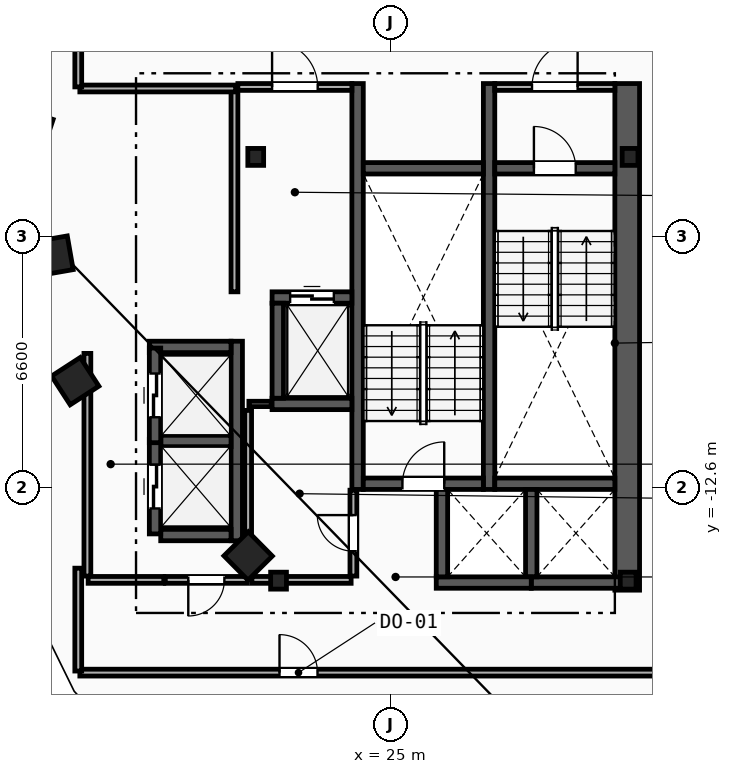
"""IFC4 building model, lengths in metres.
Left out: names, types, materials, properties, quantities, classifications, styles, units other than length and angle.
Written with IfcOpenShell. Run it as: python <this file> out.ifc"""

import sys

from ifc_helpers import new_model, si_unit, direction, frame, frame_2d, origin, origin_2d, place, context, subcontext, project, spatial, rectangle, i_section, extrude, element, fill, save


model = new_model("IFC4")
c1 = context("Model", 3, precision=1e-05, world=origin(), true_north=direction((0.0, 1.0)))
c2 = subcontext(c1, "Body", "Model", "MODEL_VIEW")
j1 = project(units=[si_unit("LENGTHUNIT", "METRE"), si_unit("PLANEANGLEUNIT", "RADIAN")], contexts=[c1])
p1 = place(None, origin())
s1 = spatial("IfcSite", under=j1, at=p1, CompositionType="ELEMENT")
p2 = place(p1, origin())
s2 = spatial("IfcBuilding", under=s1, at=p2, CompositionType="ELEMENT")
p3 = place(p2, frame((0.0, 0.0, 195.4)))
s3 = spatial("IfcBuildingStorey", under=s2, at=p3, CompositionType="ELEMENT", Elevation=195.4)
for number, where, z_axis, x_axis in (
    (1, (31.3, -3.9, 0.0), (0.0, 0.0, 1.0), (1.0, 0.0, 0.0)),
    (2, (21.45, -3.9, 0.0), (0.0, 0.0, 1.0), (1.0, 0.0, 0.0)),
    (3, (22.05, -15.05, 0.0), (0.0, 0.0, 1.0), (1.0, 0.0, 0.0)),
    (4, (31.25, -15.05, 0.0), (0.0, 0.0, 1.0), (1.0, 0.0, 0.0)),
):
    element("IfcColumn", number, at=place(p3, frame(where, z_axis=z_axis, x_axis=x_axis)), inside=s3, PredefinedType="COLUMN", context=c2, shape_type="SweptSolid", body=[
        extrude(i_section(OverallWidth=0.416, OverallDepth=0.446, WebThickness=0.039, FlangeThickness=0.063, FilletRadius=0.018, at=origin_2d()), origin(), (0.0, 0.0, 1.0), 3.6),
    ])
for number, where, z_axis, x_axis in (
    (5, (15.55, -3.2, 0.0), (0.0, 0.0, 1.0), (-0.315, -0.949, 0.0)),
    (6, (16.125, -6.5, 0.0), (0.0, 0.0, 1.0), (0.172, -0.985, 0.0)),
    (7, (16.7, -9.8, 0.0), (0.0, 0.0, 1.0), (0.544, -0.839, 0.0)),
    (8, (21.25, -14.4, 0.0), (0.0, 0.0, 1.0), (0.703, -0.711, 0.0)),
):
    element("IfcColumn", number, at=place(p3, frame(where, z_axis=z_axis, x_axis=x_axis)), inside=s3, PredefinedType="COLUMN", context=c2, shape_type="SweptSolid", body=[
        extrude(rectangle(XDim=0.9, YDim=0.9, at=origin_2d()), origin(), (0.0, 0.0, 1.0), 3.6),
    ])
p4 = place(p3, frame((31.225, -15.3, 0.0), z_axis=(0.0, 0.0, 1.0), x_axis=(0.0, 1.0, 0.0)))
e9 = element("IfcWall", 9, at=p4, inside=s3, PredefinedType="SHEAR", context=c2, shape_type="SweptSolid", body=[
    extrude(rectangle(XDim=13.33, YDim=0.65, at=frame_2d((6.665, 0.0))), origin(), (0.0, 0.0, 1.0), 3.34),
])
for number, where, z_axis, x_axis in (
    (10, (27.59, -12.65, 0.0), (0.0, 0.0, 1.0), (0.0, 1.0, 0.0)),
    (11, (24.13, -12.65, 0.0), (0.0, 0.0, 1.0), (0.0, 1.0, 0.0)),
):
    element("IfcWall", number, at=place(p3, frame(where, z_axis=z_axis, x_axis=x_axis)), inside=s3, PredefinedType="SHEAR", context=c2, shape_type="SweptSolid", body=[
        extrude(rectangle(XDim=10.68, YDim=0.3, at=frame_2d((5.34, 0.0))), origin(), (0.0, 0.0, 1.0), 3.34),
    ])
p5 = place(p3, frame((27.74, -4.2, 0.0), z_axis=(0.0, 0.0, 1.0), x_axis=(1.0, 0.0, 0.0)))
e12 = element("IfcWall", 12, at=p5, inside=s3, PredefinedType="SHEAR", context=c2, shape_type="SweptSolid", body=[
    extrude(rectangle(XDim=3.16, YDim=0.3, at=frame_2d((1.58, 0.0))), origin(), (0.0, 0.0, 1.0), 3.34),
])
p6 = place(p5, frame((1.03, 0.0, 0.0)))
e13 = element("IfcOpeningElement", 13, at=p6, cuts=e12, PredefinedType="OPENING", context=c2, shape_type="SweptSolid", body=[
    extrude(rectangle(XDim=1.1, YDim=2.15, at=frame_2d((0.55, 1.075))), frame((0.0, 0.16, 0.0), z_axis=(0.0, -1.0, 0.0), x_axis=(1.0, 0.0, 0.0)), (0.0, 0.0, 1.0), 0.32),
])
p7 = place(p3, frame((27.74, -12.5, 0.0), z_axis=(0.0, 0.0, 1.0), x_axis=(1.0, 0.0, 0.0)))
e14 = element("IfcWall", 14, at=p7, inside=s3, PredefinedType="SHEAR", context=c2, shape_type="SweptSolid", body=[
    extrude(rectangle(XDim=3.16, YDim=0.3, at=frame_2d((1.58, 0.0))), origin(), (0.0, 0.0, 1.0), 3.34),
])
p8 = place(p3, frame((24.28, -12.5, 0.0), z_axis=(0.0, 0.0, 1.0), x_axis=(1.0, 0.0, 0.0)))
e15 = element("IfcWall", 15, at=p8, inside=s3, PredefinedType="SHEAR", context=c2, shape_type="SweptSolid", body=[
    extrude(rectangle(XDim=3.16, YDim=0.3, at=frame_2d((1.58, 0.0))), origin(), (0.0, 0.0, 1.0), 3.34),
])
p9 = place(p8, frame((1.03, 0.0, 0.0)))
e16 = element("IfcOpeningElement", 16, at=p9, cuts=e15, PredefinedType="OPENING", context=c2, shape_type="SweptSolid", body=[
    extrude(rectangle(XDim=1.1, YDim=2.15, at=frame_2d((0.55, 1.075))), frame((0.0, 0.16, 0.0), z_axis=(0.0, -1.0, 0.0), x_axis=(1.0, 0.0, 0.0)), (0.0, 0.0, 1.0), 0.32),
])
p10 = place(p3, frame((24.28, -4.2, 0.0), z_axis=(0.0, 0.0, 1.0), x_axis=(1.0, 0.0, 0.0)))
e17 = element("IfcWall", 17, at=p10, inside=s3, PredefinedType="SHEAR", context=c2, shape_type="SweptSolid", body=[
    extrude(rectangle(XDim=3.16, YDim=0.3, at=frame_2d((1.58, 0.0))), origin(), (0.0, 0.0, 1.0), 3.34),
])
p11 = place(p3, frame((20.89, -7.45, 0.0), z_axis=(0.0, 0.0, 1.0), x_axis=(0.0, 1.0, 0.0)))
e18 = element("IfcWall", 18, at=p11, inside=s3, PredefinedType="PARTITIONING", context=c2, shape_type="SweptSolid", body=[
    extrude(rectangle(XDim=5.3, YDim=0.18, at=frame_2d((2.65, 0.0))), origin(), (0.0, 0.0, 1.0), 3.34),
])
p12 = place(p3, frame((20.98, -2.06, 0.0), z_axis=(0.0, 0.0, 1.0), x_axis=(1.0, 0.0, 0.0)))
e19 = element("IfcWall", 19, at=p12, inside=s3, PredefinedType="PARTITIONING", context=c2, shape_type="SweptSolid", body=[
    extrude(rectangle(XDim=3.0, YDim=0.18, at=frame_2d((1.5, 0.0))), origin(), (0.0, 0.0, 1.0), 3.34),
])
p13 = place(p12, frame((0.9, 0.0, 0.0)))
e20 = element("IfcOpeningElement", 20, at=p13, cuts=e19, PredefinedType="OPENING", context=c2, shape_type="SweptSolid", body=[
    extrude(rectangle(XDim=1.2, YDim=2.15, at=frame_2d((0.6, 1.075))), frame((0.0, 0.1, 0.0), z_axis=(0.0, -1.0, 0.0), x_axis=(1.0, 0.0, 0.0)), (0.0, 0.0, 1.0), 0.2),
])
p14 = place(p3, frame((27.74, -2.06, 0.0), z_axis=(0.0, 0.0, 1.0), x_axis=(1.0, 0.0, 0.0)))
e21 = element("IfcWall", 21, at=p14, inside=s3, PredefinedType="PARTITIONING", context=c2, shape_type="SweptSolid", body=[
    extrude(rectangle(XDim=3.16, YDim=0.18, at=frame_2d((1.58, 0.0))), origin(), (0.0, 0.0, 1.0), 3.34),
])
p15 = place(p14, frame((0.98, 0.0, 0.0)))
e22 = element("IfcOpeningElement", 22, at=p15, cuts=e21, PredefinedType="OPENING", context=c2, shape_type="SweptSolid", body=[
    extrude(rectangle(XDim=1.2, YDim=2.15, at=frame_2d((0.6, 1.075))), frame((0.0, 0.1, 0.0), z_axis=(0.0, -1.0, 0.0), x_axis=(1.0, 0.0, 0.0)), (0.0, 0.0, 1.0), 0.2),
])
p16 = place(p3, frame((21.88, -7.6, 0.0), z_axis=(0.0, 0.0, 1.0), x_axis=(1.0, 0.0, 0.0)))
e23 = element("IfcWall", 23, at=p16, inside=s3, PredefinedType="SHEAR", context=c2, shape_type="SweptSolid", body=[
    extrude(rectangle(XDim=2.1, YDim=0.3, at=frame_2d((1.05, 0.0))), origin(), (0.0, 0.0, 1.0), 3.34),
])
p17 = place(p16, frame((0.475, 0.0, 0.0)))
e24 = element("IfcOpeningElement", 24, at=p17, cuts=e23, PredefinedType="OPENING", context=c2, shape_type="SweptSolid", body=[
    extrude(rectangle(XDim=1.15, YDim=2.2, at=frame_2d((0.575, 1.1))), frame((0.0, 0.16, 0.0), z_axis=(0.0, -1.0, 0.0), x_axis=(1.0, 0.0, 0.0)), (0.0, 0.0, 1.0), 0.32),
])
p18 = place(p3, frame((21.88, -10.4, 0.0), z_axis=(0.0, 0.0, 1.0), x_axis=(1.0, 0.0, 0.0)))
e25 = element("IfcWall", 25, at=p18, inside=s3, PredefinedType="SHEAR", context=c2, shape_type="SweptSolid", body=[
    extrude(rectangle(XDim=2.1, YDim=0.3, at=frame_2d((1.05, 0.0))), origin(), (0.0, 0.0, 1.0), 3.34),
])
for number, where, z_axis, x_axis in (
    (26, (22.03, -10.25, 0.0), (0.0, 0.0, 1.0), (0.0, 1.0, 0.0)),
    (27, (28.7, -15.1, 0.0), (0.0, 0.0, 1.0), (1.0, 0.0, 0.0)),
):
    element("IfcWall", number, at=place(p3, frame(where, z_axis=z_axis, x_axis=x_axis)), inside=s3, PredefinedType="SHEAR", context=c2, shape_type="SweptSolid", body=[
        extrude(rectangle(XDim=2.5, YDim=0.3, at=frame_2d((1.25, 0.0))), origin(), (0.0, 0.0, 1.0), 3.34),
    ])
p19 = place(p3, frame((28.7, -14.95, 0.0), z_axis=(0.0, 0.0, 1.0), x_axis=(0.0, 1.0, 0.0)))
e28 = element("IfcWall", 28, at=p19, inside=s3, PredefinedType="SHEAR", context=c2, shape_type="SweptSolid", body=[
    extrude(rectangle(XDim=2.3, YDim=0.3, at=frame_2d((1.15, 0.0))), origin(), (0.0, 0.0, 1.0), 3.34),
])
p20 = place(p3, frame((26.2, -15.1, 0.0), z_axis=(0.0, 0.0, 1.0), x_axis=(1.0, 0.0, 0.0)))
e29 = element("IfcWall", 29, at=p20, inside=s3, PredefinedType="SHEAR", context=c2, shape_type="SweptSolid", body=[
    extrude(rectangle(XDim=2.5, YDim=0.3, at=frame_2d((1.25, 0.0))), origin(), (0.0, 0.0, 1.0), 3.34),
])
p21 = place(p3, frame((26.35, -14.95, 0.0), z_axis=(0.0, 0.0, 1.0), x_axis=(0.0, 1.0, 0.0)))
e30 = element("IfcWall", 30, at=p21, inside=s3, PredefinedType="SHEAR", context=c2, shape_type="SweptSolid", body=[
    extrude(rectangle(XDim=2.3, YDim=0.3, at=frame_2d((1.15, 0.0))), origin(), (0.0, 0.0, 1.0), 3.34),
])
p22 = place(p3, frame((20.95, -14.0, 0.0), z_axis=(0.0, 0.0, 1.0), x_axis=(0.0, 1.0, 0.0)))
e31 = element("IfcWall", 31, at=p22, inside=s3, PredefinedType="SHEAR", context=c2, shape_type="SweptSolid", body=[
    extrude(rectangle(XDim=5.25, YDim=0.3, at=frame_2d((2.625, 0.0))), origin(), (0.0, 0.0, 1.0), 3.34),
])
p23 = place(p3, frame((18.95, -13.85, 0.0), z_axis=(0.0, 0.0, 1.0), x_axis=(1.0, 0.0, 0.0)))
e32 = element("IfcWall", 32, at=p23, inside=s3, PredefinedType="SHEAR", context=c2, shape_type="SweptSolid", body=[
    extrude(rectangle(XDim=1.85, YDim=0.3, at=frame_2d((0.925, 0.0))), origin(), (0.0, 0.0, 1.0), 3.34),
])
p24 = place(p3, frame((18.65, -8.9, 0.0), z_axis=(0.0, 0.0, 1.0), x_axis=(1.0, 0.0, 0.0)))
e33 = element("IfcWall", 33, at=p24, inside=s3, PredefinedType="SHEAR", context=c2, shape_type="SweptSolid", body=[
    extrude(rectangle(XDim=2.15, YDim=0.3, at=frame_2d((1.075, 0.0))), origin(), (0.0, 0.0, 1.0), 3.34),
])
p25 = place(p3, frame((18.95, -11.375, 0.0), z_axis=(0.0, 0.0, 1.0), x_axis=(1.0, 0.0, 0.0)))
e34 = element("IfcWall", 34, at=p25, inside=s3, PredefinedType="SHEAR", context=c2, shape_type="SweptSolid", body=[
    extrude(rectangle(XDim=1.85, YDim=0.3, at=frame_2d((0.925, 0.0))), origin(), (0.0, 0.0, 1.0), 3.34),
])
p26 = place(p3, frame((18.8, -13.82, 0.0), z_axis=(0.0, 0.0, 1.0), x_axis=(0.0, 1.0, 0.0)))
e35 = element("IfcWall", 35, at=p26, inside=s3, PredefinedType="SHEAR", context=c2, shape_type="SweptSolid", body=[
    extrude(rectangle(XDim=2.49, YDim=0.3, at=frame_2d((1.245, 0.0))), origin(), (0.0, 0.0, 1.0), 3.34),
])
p27 = place(p26, frame((0.67, 0.0, 0.0)))
e36 = element("IfcOpeningElement", 36, at=p27, cuts=e35, PredefinedType="OPENING", context=c2, shape_type="SweptSolid", body=[
    extrude(rectangle(XDim=1.15, YDim=2.2, at=frame_2d((0.575, 1.1))), frame((0.0, 0.16, 0.0), z_axis=(0.0, -1.0, 0.0), x_axis=(1.0, 0.0, 0.0)), (0.0, 0.0, 1.0), 0.32),
])
p28 = place(p3, frame((18.8, -11.42, 0.0), z_axis=(0.0, 0.0, 1.0), x_axis=(0.0, 1.0, 0.0)))
e37 = element("IfcWall", 37, at=p28, inside=s3, PredefinedType="SHEAR", context=c2, shape_type="SweptSolid", body=[
    extrude(rectangle(XDim=2.49, YDim=0.3, at=frame_2d((1.245, 0.0))), origin(), (0.0, 0.0, 1.0), 3.34),
])
p29 = place(p28, frame((0.67, 0.0, 0.0)))
e38 = element("IfcOpeningElement", 38, at=p29, cuts=e37, PredefinedType="OPENING", context=c2, shape_type="SweptSolid", body=[
    extrude(rectangle(XDim=1.15, YDim=2.2, at=frame_2d((0.575, 1.1))), frame((0.0, 0.16, 0.0), z_axis=(0.0, -1.0, 0.0), x_axis=(1.0, 0.0, 0.0)), (0.0, 0.0, 1.0), 0.32),
])
p30 = place(p3, frame((17.02, -14.93, 0.0), z_axis=(0.0, 0.0, 1.0), x_axis=(0.0, 1.0, 0.0)))
e39 = element("IfcWall", 39, at=p30, inside=s3, PredefinedType="PARTITIONING", context=c2, shape_type="SweptSolid", body=[
    extrude(rectangle(XDim=5.86, YDim=0.18, at=frame_2d((2.93, 0.0))), origin(), (0.0, 0.0, 1.0), 3.34),
])
p31 = place(p3, frame((17.04, -15.03, 0.0), z_axis=(0.0, 0.0, 1.0), x_axis=(1.0, 0.0, 0.0)))
e40 = element("IfcWall", 40, at=p31, inside=s3, PredefinedType="PARTITIONING", context=c2, shape_type="SweptSolid", body=[
    extrude(rectangle(XDim=1.99, YDim=0.18, at=frame_2d((0.995, 0.0))), origin(), (0.0, 0.0, 1.0), 3.34),
])
p32 = place(p3, frame((21.23, -15.03, 0.0), z_axis=(0.0, 0.0, 1.0), x_axis=(-1.0, 0.0, 0.0)))
e41 = element("IfcWall", 41, at=p32, inside=s3, PredefinedType="PARTITIONING", context=c2, shape_type="SweptSolid", body=[
    extrude(rectangle(XDim=2.16, YDim=0.18, at=frame_2d((1.08, 0.0))), origin(), (0.0, 0.0, 1.0), 3.34),
])
p33 = place(p32, frame((0.605, 0.0, 0.0)))
e42 = element("IfcOpeningElement", 42, at=p33, cuts=e41, PredefinedType="OPENING", context=c2, shape_type="SweptSolid", body=[
    extrude(rectangle(XDim=0.95, YDim=2.1, at=frame_2d((0.475, 1.05))), frame((0.0, 0.1, 0.0), z_axis=(0.0, -1.0, 0.0), x_axis=(1.0, 0.0, 0.0)), (0.0, 0.0, 1.0), 0.2),
])
p34 = place(p3, frame((21.27, -10.4, 0.0), z_axis=(0.0, 0.0, 1.0), x_axis=(1.0, 0.0, 0.0)))
e43 = element("IfcWall", 43, at=p34, inside=s3, PredefinedType="PARTITIONING", context=c2, shape_type="SweptSolid", body=[
    extrude(rectangle(XDim=0.59, YDim=0.14, at=frame_2d((0.295, 0.0))), origin(), (0.0, 0.0, 1.0), 3.34),
])
p35 = place(p3, frame((21.25, -14.93, 0.0), z_axis=(0.0, 0.0, 1.0), x_axis=(0.0, 1.0, 0.0)))
e44 = element("IfcWall", 44, at=p35, inside=s3, PredefinedType="PARTITIONING", context=c2, shape_type="SweptSolid", body=[
    extrude(rectangle(XDim=4.36, YDim=0.18, at=frame_2d((2.18, 0.0))), origin(), (0.0, 0.0, 1.0), 3.34),
])
p36 = place(p3, frame((21.35, -15.03, 0.0), z_axis=(0.0, 0.0, 1.0), x_axis=(1.0, 0.0, 0.0)))
e45 = element("IfcWall", 45, at=p36, inside=s3, PredefinedType="PARTITIONING", context=c2, shape_type="SweptSolid", body=[
    extrude(rectangle(XDim=2.61, YDim=0.18, at=frame_2d((1.305, 0.0))), origin(), (0.0, 0.0, 1.0), 2.413),
])
p37 = place(p3, frame((24.02, -14.93, 0.0), z_axis=(0.0, 0.0, 1.0), x_axis=(0.0, 1.0, 0.0)))
e46 = element("IfcWall", 46, at=p37, inside=s3, PredefinedType="PARTITIONING", context=c2, shape_type="SweptSolid", body=[
    extrude(rectangle(XDim=2.26, YDim=0.18, at=frame_2d((1.13, 0.0))), origin(), (0.0, 0.0, 1.0), 3.34),
])
p38 = place(p37, frame((0.655, 0.0, 0.0)))
e47 = element("IfcOpeningElement", 47, at=p38, cuts=e46, PredefinedType="OPENING", context=c2, shape_type="SweptSolid", body=[
    extrude(rectangle(XDim=0.95, YDim=2.1, at=frame_2d((0.475, 1.05))), frame((0.0, 0.1, 0.0), z_axis=(0.0, -1.0, 0.0), x_axis=(1.0, 0.0, 0.0)), (0.0, 0.0, 1.0), 0.2),
])
p39 = place(p3, frame((16.822, -17.47, 0.0), z_axis=(0.0, 0.0, 1.0), x_axis=(1.0, 0.0, 0.0)))
e48 = element("IfcWall", 48, at=p39, inside=s3, PredefinedType="PARTITIONING", context=c2, shape_type="SweptSolid", body=[
    extrude(rectangle(XDim=15.908, YDim=0.18, at=frame_2d((7.954, 0.0))), origin(), (0.0, 0.0, 1.0), 3.34),
])
p40 = place(p39, frame((5.254, 0.0, 0.0)))
e49 = element("IfcOpeningElement", 49, at=p40, cuts=e48, PredefinedType="OPENING", context=c2, shape_type="SweptSolid", body=[
    extrude(rectangle(XDim=1.0, YDim=2.15, at=frame_2d((0.5, 1.075))), frame((0.0, 0.1, 0.0), z_axis=(0.0, -1.0, 0.0), x_axis=(1.0, 0.0, 0.0)), (0.0, 0.0, 1.0), 0.2),
])
p41 = place(p3, frame((16.822, -2.1, 0.0), z_axis=(0.0, 0.0, 1.0), x_axis=(1.0, 0.0, 0.0)))
e50 = element("IfcWall", 50, at=p41, inside=s3, PredefinedType="PARTITIONING", context=c2, shape_type="SweptSolid", body=[
    extrude(rectangle(XDim=4.098, YDim=0.18, at=frame_2d((2.049, 0.0))), origin(), (0.0, 0.0, 1.0), 3.34),
])
p42 = place(p3, frame((16.78, -14.721, 0.0), z_axis=(0.0, 0.0, 1.0), x_axis=(0.0, -1.0, 0.0)))
e51 = element("IfcWall", 51, at=p42, inside=s3, PredefinedType="PARTITIONING", context=c2, shape_type="SweptSolid", body=[
    extrude(rectangle(XDim=2.707, YDim=0.18, at=frame_2d((1.354, 0.0))), origin(), (0.0, 0.0, 1.0), 3.34),
])
p43 = place(p3, frame((16.78, 0.329, 0.0), z_axis=(0.0, 0.0, 1.0), x_axis=(0.0, -1.0, 0.0)))
e52 = element("IfcWall", 52, at=p43, inside=s3, PredefinedType="PARTITIONING", context=c2, shape_type="SweptSolid", body=[
    extrude(rectangle(XDim=2.387, YDim=0.18, at=frame_2d((1.194, 0.0))), origin(), (0.0, 0.0, 1.0), 3.34),
])
p44 = place(p6, origin())
e53 = element("IfcDoor", 53, at=p44, inside=s3, OperationType="SINGLE_SWING_LEFT", PredefinedType="DOOR", context=c2, shape_type="SweptSolid", body=[
    extrude(rectangle(XDim=1.1, YDim=2.15, at=frame_2d((0.55, 1.075))), frame((0.0, 0.025, 0.0), z_axis=(0.0, -1.0, 0.0), x_axis=(1.0, 0.0, 0.0)), (0.0, 0.0, 1.0), 0.05),
])
fill(e13, e53)
p45 = place(p9, origin())
e54 = element("IfcDoor", 54, at=p45, inside=s3, OperationType="SINGLE_SWING_RIGHT", PredefinedType="DOOR", context=c2, shape_type="SweptSolid", body=[
    extrude(rectangle(XDim=1.1, YDim=2.15, at=frame_2d((0.55, 1.075))), frame((0.0, 0.025, 0.0), z_axis=(0.0, -1.0, 0.0), x_axis=(1.0, 0.0, 0.0)), (0.0, 0.0, 1.0), 0.05),
])
fill(e16, e54)
p46 = place(p13, origin())
e55 = element("IfcDoor", 55, at=p46, inside=s3, OperationType="SINGLE_SWING_LEFT", PredefinedType="DOOR", context=c2, shape_type="SweptSolid", body=[
    extrude(rectangle(XDim=1.2, YDim=2.15, at=frame_2d((0.6, 1.075))), frame((0.0, 0.025, 0.0), z_axis=(0.0, -1.0, 0.0), x_axis=(1.0, 0.0, 0.0)), (0.0, 0.0, 1.0), 0.05),
])
fill(e20, e55)
p47 = place(p15, origin())
e56 = element("IfcDoor", 56, at=p47, inside=s3, OperationType="SINGLE_SWING_RIGHT", PredefinedType="DOOR", context=c2, shape_type="SweptSolid", body=[
    extrude(rectangle(XDim=1.2, YDim=2.15, at=frame_2d((0.6, 1.075))), frame((0.0, 0.025, 0.0), z_axis=(0.0, -1.0, 0.0), x_axis=(1.0, 0.0, 0.0)), (0.0, 0.0, 1.0), 0.05),
])
fill(e22, e56)
p48 = place(p17, origin())
e57 = element("IfcDoor", 57, at=p48, inside=s3, OperationType="SLIDING_TO_LEFT", PredefinedType="TRAPDOOR", context=c2, shape_type="SweptSolid", body=[
    extrude(rectangle(XDim=1.15, YDim=2.2, at=frame_2d((0.575, 1.1))), frame((0.0, 0.025, 0.0), z_axis=(0.0, -1.0, 0.0), x_axis=(1.0, 0.0, 0.0)), (0.0, 0.0, 1.0), 0.05),
])
fill(e24, e57)
p49 = place(p27, origin())
e58 = element("IfcDoor", 58, at=p49, inside=s3, OperationType="SLIDING_TO_LEFT", PredefinedType="TRAPDOOR", context=c2, shape_type="SweptSolid", body=[
    extrude(rectangle(XDim=1.15, YDim=2.2, at=frame_2d((0.575, 1.1))), frame((0.0, 0.025, 0.0), z_axis=(0.0, -1.0, 0.0), x_axis=(1.0, 0.0, 0.0)), (0.0, 0.0, 1.0), 0.05),
])
fill(e36, e58)
p50 = place(p29, origin())
e59 = element("IfcDoor", 59, at=p50, inside=s3, OperationType="SLIDING_TO_LEFT", PredefinedType="TRAPDOOR", context=c2, shape_type="SweptSolid", body=[
    extrude(rectangle(XDim=1.15, YDim=2.2, at=frame_2d((0.575, 1.1))), frame((0.0, 0.025, 0.0), z_axis=(0.0, -1.0, 0.0), x_axis=(1.0, 0.0, 0.0)), (0.0, 0.0, 1.0), 0.05),
])
fill(e38, e59)
p51 = place(p40, origin())
e60 = element("IfcDoor", 60, at=p51, inside=s3, OperationType="SINGLE_SWING_LEFT", PredefinedType="DOOR", context=c2, shape_type="SweptSolid", body=[
    extrude(rectangle(XDim=1.0, YDim=2.15, at=frame_2d((0.5, 1.075))), frame((0.0, 0.025, 0.0), z_axis=(0.0, -1.0, 0.0), x_axis=(1.0, 0.0, 0.0)), (0.0, 0.0, 1.0), 0.05),
])
fill(e49, e60)
p52 = place(p38, origin())
e61 = element("IfcDoor", 61, at=p52, inside=s3, OperationType="SINGLE_SWING_RIGHT", PredefinedType="DOOR", context=c2, shape_type="SweptSolid", body=[
    extrude(rectangle(XDim=0.95, YDim=2.1, at=frame_2d((0.475, 1.05))), frame((0.0, 0.025, 0.0), z_axis=(0.0, -1.0, 0.0), x_axis=(1.0, 0.0, 0.0)), (0.0, 0.0, 1.0), 0.05),
])
fill(e47, e61)
p53 = place(p33, origin())
e62 = element("IfcDoor", 62, at=p53, inside=s3, OperationType="SINGLE_SWING_RIGHT", PredefinedType="DOOR", context=c2, shape_type="SweptSolid", body=[
    extrude(rectangle(XDim=0.95, YDim=2.1, at=frame_2d((0.475, 1.05))), frame((0.0, 0.025, 0.0), z_axis=(0.0, -1.0, 0.0), x_axis=(1.0, 0.0, 0.0)), (0.0, 0.0, 1.0), 0.05),
])
fill(e42, e62)
save(model, sys.argv[1])
